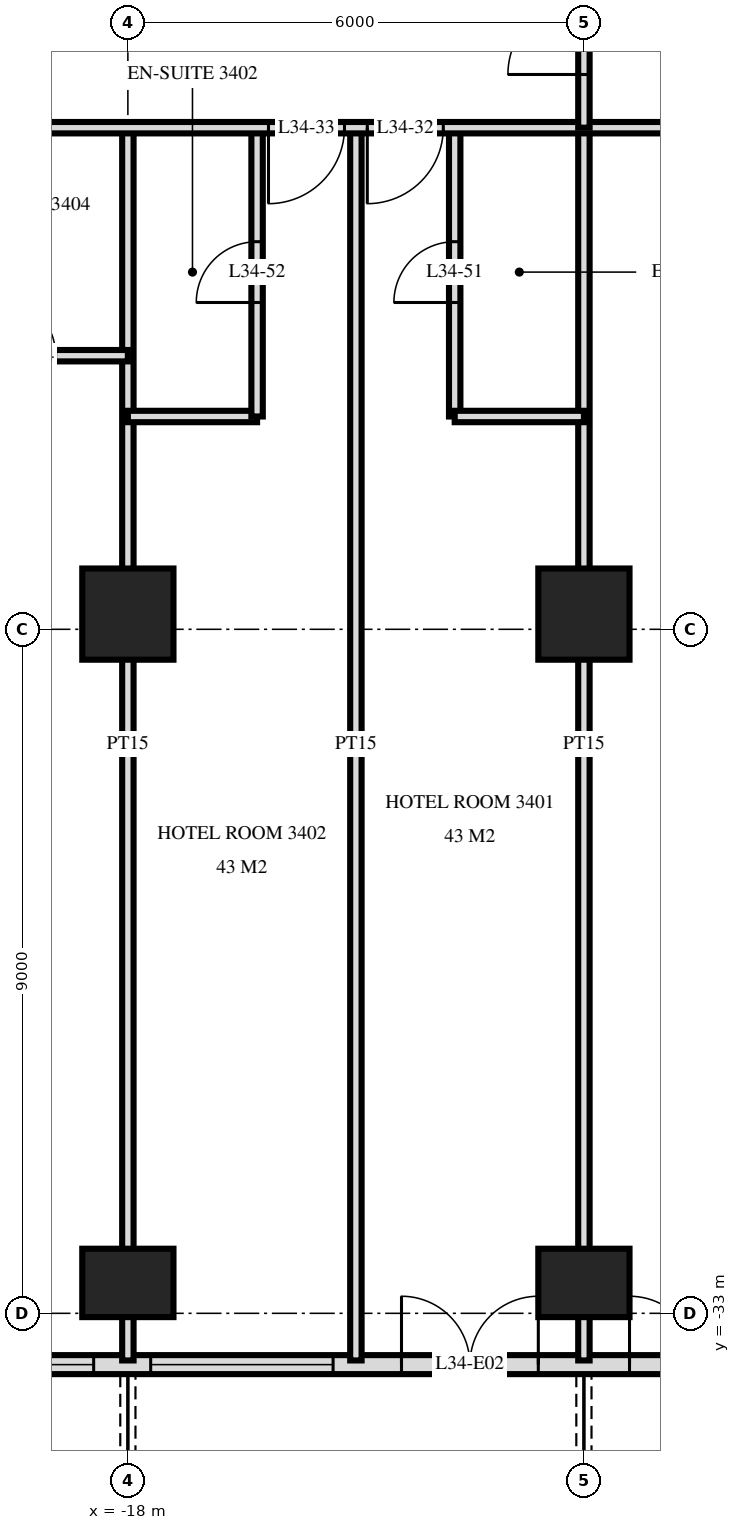
"""IFC4 building model, lengths in metres.
Left out: names, types, materials, properties, quantities, classifications, styles, units other than length and angle.
Written with IfcOpenShell. Run it as: python <this file> out.ifc"""

import sys

from ifc_helpers import new_model, si_unit, direction, frame, frame_2d, origin, origin_2d, place, context, subcontext, project, spatial, rectangle, extrude, element, fill, save


model = new_model("IFC4")
c1 = context("Model", 3, precision=1e-05, world=origin(), true_north=direction((0.0, 1.0)))
c2 = subcontext(c1, "Body", "Model", "MODEL_VIEW")
j1 = project(units=[si_unit("LENGTHUNIT", "METRE"), si_unit("PLANEANGLEUNIT", "RADIAN")], contexts=[c1])
p1 = place(None, origin())
s1 = spatial("IfcSite", under=j1, at=p1, CompositionType="ELEMENT")
p2 = place(p1, origin())
s2 = spatial("IfcBuilding", under=s1, at=p2, CompositionType="ELEMENT")
p3 = place(p2, frame((0.0, 0.0, 134.4)))
s3 = spatial("IfcBuildingStorey", under=s2, at=p3, CompositionType="ELEMENT", Elevation=134.4)
p4 = place(p3, frame((-18.0, -32.6, 0.0), z_axis=(0.0, 0.0, 1.0), x_axis=(1.0, 0.0, 0.0)))
e1 = element("IfcColumn", 1, at=p4, inside=s3, PredefinedType="COLUMN", context=c2, shape_type="SweptSolid", body=[
    extrude(rectangle(XDim=1.2, YDim=0.9, at=origin_2d()), origin(), (0.0, 0.0, 1.0), 3.6),
])
p5 = place(p3, frame((-18.0, -23.8, 0.0), z_axis=(0.0, 0.0, 1.0), x_axis=(1.0, 0.0, 0.0)))
e2 = element("IfcColumn", 2, at=p5, inside=s3, PredefinedType="COLUMN", context=c2, shape_type="SweptSolid", body=[
    extrude(rectangle(XDim=1.2, YDim=1.2, at=origin_2d()), origin(), (0.0, 0.0, 1.0), 3.6),
])
p6 = place(p3, frame((-12.0, -32.6, 0.0), z_axis=(0.0, 0.0, 1.0), x_axis=(1.0, 0.0, 0.0)))
e3 = element("IfcColumn", 3, at=p6, inside=s3, PredefinedType="COLUMN", context=c2, shape_type="SweptSolid", body=[
    extrude(rectangle(XDim=1.2, YDim=0.9, at=origin_2d()), origin(), (0.0, 0.0, 1.0), 3.6),
])
p7 = place(p3, frame((-12.0, -23.8, 0.0), z_axis=(0.0, 0.0, 1.0), x_axis=(1.0, 0.0, 0.0)))
e4 = element("IfcColumn", 4, at=p7, inside=s3, PredefinedType="COLUMN", context=c2, shape_type="SweptSolid", body=[
    extrude(rectangle(XDim=1.2, YDim=1.2, at=origin_2d()), origin(), (0.0, 0.0, 1.0), 3.6),
])
p8 = place(p3, frame((-23.675, -33.675, 0.0), z_axis=(0.0, 0.0, 1.0), x_axis=(1.0, 0.0, 0.0)))
e5 = element("IfcWall", 5, at=p8, inside=s3, PredefinedType="SOLIDWALL", context=c2, shape_type="SweptSolid", body=[
    extrude(rectangle(XDim=47.351, YDim=0.25, at=frame_2d((23.675, 0.0))), origin(), (0.0, 0.0, 1.0), 3.32),
])
p9 = place(p8, frame((0.575, 0.0, 0.0)))
e6 = element("IfcOpeningElement", 6, at=p9, cuts=e5, PredefinedType="OPENING", context=c2, shape_type="SweptSolid", body=[
    extrude(rectangle(XDim=1.8, YDim=2.4, at=frame_2d((0.9, 1.2))), frame((0.0, 0.135, 0.0), z_axis=(0.0, -1.0, 0.0), x_axis=(1.0, 0.0, 0.0)), (0.0, 0.0, 1.0), 0.27),
])
p10 = place(p8, frame((3.425, 0.0, 0.3)))
e7 = element("IfcOpeningElement", 7, at=p10, cuts=e5, PredefinedType="OPENING", context=c2, shape_type="SweptSolid", body=[
    extrude(rectangle(XDim=1.8, YDim=2.1, at=frame_2d((0.9, 1.05))), frame((0.0, 0.135, 0.0), z_axis=(0.0, -1.0, 0.0), x_axis=(1.0, 0.0, 0.0)), (0.0, 0.0, 1.0), 0.27),
])
p11 = place(p8, frame((5.975, 0.0, 0.3)))
e8 = element("IfcOpeningElement", 8, at=p11, cuts=e5, PredefinedType="OPENING", context=c2, shape_type="SweptSolid", body=[
    extrude(rectangle(XDim=2.4, YDim=2.1, at=frame_2d((1.2, 1.05))), frame((0.0, 0.135, 0.0), z_axis=(0.0, -1.0, 0.0), x_axis=(1.0, 0.0, 0.0)), (0.0, 0.0, 1.0), 0.27),
])
p12 = place(p8, frame((9.275, 0.0, 0.0)))
e9 = element("IfcOpeningElement", 9, at=p12, cuts=e5, PredefinedType="OPENING", context=c2, shape_type="SweptSolid", body=[
    extrude(rectangle(XDim=1.8, YDim=2.4, at=frame_2d((0.9, 1.2))), frame((0.0, 0.135, 0.0), z_axis=(0.0, -1.0, 0.0), x_axis=(1.0, 0.0, 0.0)), (0.0, 0.0, 1.0), 0.27),
])
p13 = place(p8, frame((12.275, 0.0, 0.0)))
e10 = element("IfcOpeningElement", 10, at=p13, cuts=e5, PredefinedType="OPENING", context=c2, shape_type="SweptSolid", body=[
    extrude(rectangle(XDim=1.8, YDim=2.4, at=frame_2d((0.9, 1.2))), frame((0.0, 0.135, 0.0), z_axis=(0.0, -1.0, 0.0), x_axis=(1.0, 0.0, 0.0)), (0.0, 0.0, 1.0), 0.27),
])
p14 = place(p8, frame((14.975, 0.0, 0.3)))
e11 = element("IfcOpeningElement", 11, at=p14, cuts=e5, PredefinedType="OPENING", context=c2, shape_type="SweptSolid", body=[
    extrude(rectangle(XDim=2.4, YDim=2.1, at=frame_2d((1.2, 1.05))), frame((0.0, 0.135, 0.0), z_axis=(0.0, -1.0, 0.0), x_axis=(1.0, 0.0, 0.0)), (0.0, 0.0, 1.0), 0.27),
])
p15 = place(p8, frame((17.975, 0.0, 0.3)))
e12 = element("IfcOpeningElement", 12, at=p15, cuts=e5, PredefinedType="OPENING", context=c2, shape_type="SweptSolid", body=[
    extrude(rectangle(XDim=2.4, YDim=2.1, at=frame_2d((1.2, 1.05))), frame((0.0, 0.135, 0.0), z_axis=(0.0, -1.0, 0.0), x_axis=(1.0, 0.0, 0.0)), (0.0, 0.0, 1.0), 0.27),
])
p16 = place(p8, frame((21.275, 0.0, 0.0)))
e13 = element("IfcOpeningElement", 13, at=p16, cuts=e5, PredefinedType="OPENING", context=c2, shape_type="SweptSolid", body=[
    extrude(rectangle(XDim=1.8, YDim=2.4, at=frame_2d((0.9, 1.2))), frame((0.0, 0.135, 0.0), z_axis=(0.0, -1.0, 0.0), x_axis=(1.0, 0.0, 0.0)), (0.0, 0.0, 1.0), 0.27),
])
p17 = place(p8, frame((24.275, 0.0, 0.0)))
e14 = element("IfcOpeningElement", 14, at=p17, cuts=e5, PredefinedType="OPENING", context=c2, shape_type="SweptSolid", body=[
    extrude(rectangle(XDim=1.8, YDim=2.4, at=frame_2d((0.9, 1.2))), frame((0.0, 0.135, 0.0), z_axis=(0.0, -1.0, 0.0), x_axis=(1.0, 0.0, 0.0)), (0.0, 0.0, 1.0), 0.27),
])
p18 = place(p8, frame((26.975, 0.0, 0.3)))
e15 = element("IfcOpeningElement", 15, at=p18, cuts=e5, PredefinedType="OPENING", context=c2, shape_type="SweptSolid", body=[
    extrude(rectangle(XDim=2.4, YDim=2.1, at=frame_2d((1.2, 1.05))), frame((0.0, 0.135, 0.0), z_axis=(0.0, -1.0, 0.0), x_axis=(1.0, 0.0, 0.0)), (0.0, 0.0, 1.0), 0.27),
])
p19 = place(p8, frame((30.275, 0.0, 0.0)))
e16 = element("IfcOpeningElement", 16, at=p19, cuts=e5, PredefinedType="OPENING", context=c2, shape_type="SweptSolid", body=[
    extrude(rectangle(XDim=1.8, YDim=2.4, at=frame_2d((0.9, 1.2))), frame((0.0, 0.135, 0.0), z_axis=(0.0, -1.0, 0.0), x_axis=(1.0, 0.0, 0.0)), (0.0, 0.0, 1.0), 0.27),
])
p20 = place(p8, frame((32.975, 0.0, 0.3)))
e17 = element("IfcOpeningElement", 17, at=p20, cuts=e5, PredefinedType="OPENING", context=c2, shape_type="SweptSolid", body=[
    extrude(rectangle(XDim=2.4, YDim=2.1, at=frame_2d((1.2, 1.05))), frame((0.0, 0.135, 0.0), z_axis=(0.0, -1.0, 0.0), x_axis=(1.0, 0.0, 0.0)), (0.0, 0.0, 1.0), 0.27),
])
p21 = place(p8, frame((36.275, 0.0, 0.0)))
e18 = element("IfcOpeningElement", 18, at=p21, cuts=e5, PredefinedType="OPENING", context=c2, shape_type="SweptSolid", body=[
    extrude(rectangle(XDim=1.8, YDim=2.4, at=frame_2d((0.9, 1.2))), frame((0.0, 0.135, 0.0), z_axis=(0.0, -1.0, 0.0), x_axis=(1.0, 0.0, 0.0)), (0.0, 0.0, 1.0), 0.27),
])
p22 = place(p8, frame((38.975, 0.0, 0.3)))
e19 = element("IfcOpeningElement", 19, at=p22, cuts=e5, PredefinedType="OPENING", context=c2, shape_type="SweptSolid", body=[
    extrude(rectangle(XDim=2.4, YDim=2.1, at=frame_2d((1.2, 1.05))), frame((0.0, 0.135, 0.0), z_axis=(0.0, -1.0, 0.0), x_axis=(1.0, 0.0, 0.0)), (0.0, 0.0, 1.0), 0.27),
])
p23 = place(p8, frame((42.275, 0.0, 0.0)))
e20 = element("IfcOpeningElement", 20, at=p23, cuts=e5, PredefinedType="OPENING", context=c2, shape_type="SweptSolid", body=[
    extrude(rectangle(XDim=1.8, YDim=2.4, at=frame_2d((0.9, 1.2))), frame((0.0, 0.135, 0.0), z_axis=(0.0, -1.0, 0.0), x_axis=(1.0, 0.0, 0.0)), (0.0, 0.0, 1.0), 0.27),
])
p24 = place(p8, frame((45.125, 0.0, 0.3)))
e21 = element("IfcOpeningElement", 21, at=p24, cuts=e5, PredefinedType="OPENING", context=c2, shape_type="SweptSolid", body=[
    extrude(rectangle(XDim=1.8, YDim=2.1, at=frame_2d((0.9, 1.05))), frame((0.0, 0.135, 0.0), z_axis=(0.0, -1.0, 0.0), x_axis=(1.0, 0.0, 0.0)), (0.0, 0.0, 1.0), 0.27),
])
p25 = place(p3, frame((-12.0, -17.4, 0.0), z_axis=(0.0, 0.0, 1.0), x_axis=(0.0, 1.0, 0.0)))
e22 = element("IfcWall", 22, at=p25, inside=s3, PredefinedType="PARTITIONING", context=c2, shape_type="SweptSolid", body=[
    extrude(rectangle(XDim=2.35, YDim=0.15, at=frame_2d((1.175, 0.0))), origin(), (0.0, 0.0, 1.0), 3.32),
])
p26 = place(p25, frame((0.7, 0.0, 0.0)))
e23 = element("IfcOpeningElement", 23, at=p26, cuts=e22, PredefinedType="OPENING", context=c2, shape_type="SweptSolid", body=[
    extrude(rectangle(XDim=1.0, YDim=2.1, at=frame_2d((0.5, 1.05))), frame((0.0, 0.085, 0.0), z_axis=(0.0, -1.0, 0.0), x_axis=(1.0, 0.0, 0.0)), (0.0, 0.0, 1.0), 0.17),
])
p27 = place(p3, frame((-12.0, -33.62, 0.0), z_axis=(0.0, 0.0, 1.0), x_axis=(0.0, 1.0, 0.0)))
e24 = element("IfcWall", 24, at=p27, inside=s3, PredefinedType="PARTITIONING", context=c2, shape_type="SweptSolid", body=[
    extrude(rectangle(XDim=16.22, YDim=0.15, at=frame_2d((8.11, 0.0))), origin(), (0.0, 0.0, 1.0), 3.32),
])
p28 = place(p3, frame((-13.7, -21.2, 0.0), z_axis=(0.0, 0.0, 1.0), x_axis=(0.0, 1.0, 0.0)))
e25 = element("IfcWall", 25, at=p28, inside=s3, PredefinedType="PARTITIONING", context=c2, shape_type="SweptSolid", body=[
    extrude(rectangle(XDim=3.8, YDim=0.15, at=frame_2d((1.9, 0.0))), origin(), (0.0, 0.0, 1.0), 3.32),
])
p29 = place(p28, frame((1.5, 0.0, 0.0)))
e26 = element("IfcOpeningElement", 26, at=p29, cuts=e25, PredefinedType="OPENING", context=c2, shape_type="SweptSolid", body=[
    extrude(rectangle(XDim=0.8, YDim=2.1, at=frame_2d((0.4, 1.05))), frame((0.0, 0.085, 0.0), z_axis=(0.0, -1.0, 0.0), x_axis=(1.0, 0.0, 0.0)), (0.0, 0.0, 1.0), 0.17),
])
p30 = place(p3, frame((-15.0, -33.62, 0.0), z_axis=(0.0, 0.0, 1.0), x_axis=(0.0, 1.0, 0.0)))
e27 = element("IfcWall", 27, at=p30, inside=s3, PredefinedType="PARTITIONING", context=c2, shape_type="SweptSolid", body=[
    extrude(rectangle(XDim=16.22, YDim=0.15, at=frame_2d((8.11, 0.0))), origin(), (0.0, 0.0, 1.0), 3.32),
])
p31 = place(p3, frame((-16.3, -21.2, 0.0), z_axis=(0.0, 0.0, 1.0), x_axis=(0.0, 1.0, 0.0)))
e28 = element("IfcWall", 28, at=p31, inside=s3, PredefinedType="PARTITIONING", context=c2, shape_type="SweptSolid", body=[
    extrude(rectangle(XDim=3.8, YDim=0.15, at=frame_2d((1.9, 0.0))), origin(), (0.0, 0.0, 1.0), 3.32),
])
p32 = place(p31, frame((1.5, 0.0, 0.0)))
e29 = element("IfcOpeningElement", 29, at=p32, cuts=e28, PredefinedType="OPENING", context=c2, shape_type="SweptSolid", body=[
    extrude(rectangle(XDim=0.8, YDim=2.1, at=frame_2d((0.4, 1.05))), frame((0.0, 0.085, 0.0), z_axis=(0.0, -1.0, 0.0), x_axis=(1.0, 0.0, 0.0)), (0.0, 0.0, 1.0), 0.17),
])
p33 = place(p3, frame((-18.0, -33.62, 0.0), z_axis=(0.0, 0.0, 1.0), x_axis=(0.0, 1.0, 0.0)))
e30 = element("IfcWall", 30, at=p33, inside=s3, PredefinedType="PARTITIONING", context=c2, shape_type="SweptSolid", body=[
    extrude(rectangle(XDim=16.22, YDim=0.15, at=frame_2d((8.11, 0.0))), origin(), (0.0, 0.0, 1.0), 3.32),
])
for number, where, z_axis, x_axis in (
    (31, (-18.0, -21.2, 0.0), (0.0, 0.0, 1.0), (1.0, 0.0, 0.0)),
    (32, (-13.7, -21.2, 0.0), (0.0, 0.0, 1.0), (1.0, 0.0, 0.0)),
):
    element("IfcWall", number, at=place(p3, frame(where, z_axis=z_axis, x_axis=x_axis)), inside=s3, PredefinedType="PARTITIONING", context=c2, shape_type="SweptSolid", body=[
        extrude(rectangle(XDim=1.7, YDim=0.15, at=frame_2d((0.85, 0.0))), origin(), (0.0, 0.0, 1.0), 3.32),
    ])
p34 = place(p3, frame((-22.2, -20.4, 0.0), z_axis=(0.0, 0.0, 1.0), x_axis=(1.0, 0.0, 0.0)))
e33 = element("IfcWall", 33, at=p34, inside=s3, PredefinedType="PARTITIONING", context=c2, shape_type="SweptSolid", body=[
    extrude(rectangle(XDim=4.2, YDim=0.15, at=frame_2d((2.1, 0.0))), origin(), (0.0, 0.0, 1.0), 3.32),
])
p35 = place(p34, frame((2.45, 0.0, 0.0)))
e34 = element("IfcOpeningElement", 34, at=p35, cuts=e33, PredefinedType="OPENING", context=c2, shape_type="SweptSolid", body=[
    extrude(rectangle(XDim=0.8, YDim=2.1, at=frame_2d((0.4, 1.05))), frame((0.0, 0.085, 0.0), z_axis=(0.0, -1.0, 0.0), x_axis=(1.0, 0.0, 0.0)), (0.0, 0.0, 1.0), 0.17),
])
p36 = place(p3, frame((-28.02, -17.4, 0.0), z_axis=(0.0, 0.0, 1.0), x_axis=(1.0, 0.0, 0.0)))
e35 = element("IfcWall", 35, at=p36, inside=s3, PredefinedType="PARTITIONING", context=c2, shape_type="SweptSolid", body=[
    extrude(rectangle(XDim=56.04, YDim=0.15, at=frame_2d((28.02, 0.0))), origin(), (0.0, 0.0, 1.0), 3.32),
])
p37 = place(p36, frame((13.17, 0.0, 0.0)))
e36 = element("IfcOpeningElement", 36, at=p37, cuts=e35, PredefinedType="OPENING", context=c2, shape_type="SweptSolid", body=[
    extrude(rectangle(XDim=1.0, YDim=2.1, at=frame_2d((0.5, 1.05))), frame((0.0, 0.085, 0.0), z_axis=(0.0, -1.0, 0.0), x_axis=(1.0, 0.0, 0.0)), (0.0, 0.0, 1.0), 0.17),
])
p38 = place(p36, frame((11.87, 0.0, 0.0)))
e37 = element("IfcOpeningElement", 37, at=p38, cuts=e35, PredefinedType="OPENING", context=c2, shape_type="SweptSolid", body=[
    extrude(rectangle(XDim=1.0, YDim=2.1, at=frame_2d((0.5, 1.05))), frame((0.0, 0.085, 0.0), z_axis=(0.0, -1.0, 0.0), x_axis=(1.0, 0.0, 0.0)), (0.0, 0.0, 1.0), 0.17),
])
p39 = place(p36, frame((2.32, 0.0, 0.0)))
e38 = element("IfcOpeningElement", 38, at=p39, cuts=e35, PredefinedType="OPENING", context=c2, shape_type="SweptSolid", body=[
    extrude(rectangle(XDim=1.0, YDim=2.1, at=frame_2d((0.5, 1.05))), frame((0.0, 0.085, 0.0), z_axis=(0.0, -1.0, 0.0), x_axis=(1.0, 0.0, 0.0)), (0.0, 0.0, 1.0), 0.17),
])
p40 = place(p36, frame((40.17, 0.0, 0.0)))
e39 = element("IfcOpeningElement", 39, at=p40, cuts=e35, PredefinedType="OPENING", context=c2, shape_type="SweptSolid", body=[
    extrude(rectangle(XDim=1.0, YDim=2.1, at=frame_2d((0.5, 1.05))), frame((0.0, 0.085, 0.0), z_axis=(0.0, -1.0, 0.0), x_axis=(1.0, 0.0, 0.0)), (0.0, 0.0, 1.0), 0.17),
])
p41 = place(p36, frame((51.22, 0.0, 0.0)))
e40 = element("IfcOpeningElement", 40, at=p41, cuts=e35, PredefinedType="OPENING", context=c2, shape_type="SweptSolid", body=[
    extrude(rectangle(XDim=1.0, YDim=2.1, at=frame_2d((0.5, 1.05))), frame((0.0, 0.085, 0.0), z_axis=(0.0, -1.0, 0.0), x_axis=(1.0, 0.0, 0.0)), (0.0, 0.0, 1.0), 0.17),
])
p42 = place(p36, frame((18.52, 0.0, 0.0)))
e41 = element("IfcOpeningElement", 41, at=p42, cuts=e35, PredefinedType="OPENING", context=c2, shape_type="SweptSolid", body=[
    extrude(rectangle(XDim=1.0, YDim=2.1, at=frame_2d((0.5, 1.05))), frame((0.0, 0.085, 0.0), z_axis=(0.0, -1.0, 0.0), x_axis=(1.0, 0.0, 0.0)), (0.0, 0.0, 1.0), 0.17),
])
p43 = place(p36, frame((26.02, 0.0, 0.0)))
e42 = element("IfcOpeningElement", 42, at=p43, cuts=e35, PredefinedType="OPENING", context=c2, shape_type="SweptSolid", body=[
    extrude(rectangle(XDim=1.0, YDim=2.1, at=frame_2d((0.5, 1.05))), frame((0.0, 0.085, 0.0), z_axis=(0.0, -1.0, 0.0), x_axis=(1.0, 0.0, 0.0)), (0.0, 0.0, 1.0), 0.17),
])
p44 = place(p36, frame((35.02, 0.0, 0.0)))
e43 = element("IfcOpeningElement", 43, at=p44, cuts=e35, PredefinedType="OPENING", context=c2, shape_type="SweptSolid", body=[
    extrude(rectangle(XDim=1.0, YDim=2.1, at=frame_2d((0.5, 1.05))), frame((0.0, 0.085, 0.0), z_axis=(0.0, -1.0, 0.0), x_axis=(1.0, 0.0, 0.0)), (0.0, 0.0, 1.0), 0.17),
])
p45 = place(p10, origin())
e44 = element("IfcWindow", 44, at=p45, inside=s3, PartitioningType="SINGLE_PANEL", PredefinedType="WINDOW", context=c2, shape_type="SweptSolid", body=[
    extrude(rectangle(XDim=1.8, YDim=2.1, at=frame_2d((0.9, 1.05))), frame((0.0, 0.03, 0.0), z_axis=(0.0, -1.0, 0.0), x_axis=(1.0, 0.0, 0.0)), (0.0, 0.0, 1.0), 0.06),
])
fill(e7, e44)
p46 = place(p11, origin())
e45 = element("IfcWindow", 45, at=p46, inside=s3, PartitioningType="SINGLE_PANEL", PredefinedType="WINDOW", context=c2, shape_type="SweptSolid", body=[
    extrude(rectangle(XDim=2.4, YDim=2.1, at=frame_2d((1.2, 1.05))), frame((0.0, 0.03, 0.0), z_axis=(0.0, -1.0, 0.0), x_axis=(1.0, 0.0, 0.0)), (0.0, 0.0, 1.0), 0.06),
])
fill(e8, e45)
p47 = place(p12, origin())
e46 = element("IfcDoor", 46, at=p47, inside=s3, OperationType="DOUBLE_DOOR_SINGLE_SWING", PredefinedType="DOOR", context=c2, shape_type="SweptSolid", body=[
    extrude(rectangle(XDim=1.8, YDim=2.4, at=frame_2d((0.9, 1.2))), frame((0.0, 0.025, 0.0), z_axis=(0.0, -1.0, 0.0), x_axis=(1.0, 0.0, 0.0)), (0.0, 0.0, 1.0), 0.05),
])
fill(e9, e46)
p48 = place(p13, origin())
e47 = element("IfcDoor", 47, at=p48, inside=s3, OperationType="DOUBLE_DOOR_SINGLE_SWING", PredefinedType="DOOR", context=c2, shape_type="SweptSolid", body=[
    extrude(rectangle(XDim=1.8, YDim=2.4, at=frame_2d((0.9, 1.2))), frame((0.0, 0.025, 0.0), z_axis=(0.0, -1.0, 0.0), x_axis=(1.0, 0.0, 0.0)), (0.0, 0.0, 1.0), 0.05),
])
fill(e10, e47)
p49 = place(p26, origin())
e48 = element("IfcDoor", 48, at=p49, inside=s3, OperationType="SINGLE_SWING_RIGHT", PredefinedType="DOOR", context=c2, shape_type="SweptSolid", body=[
    extrude(rectangle(XDim=1.0, YDim=2.1, at=frame_2d((0.5, 1.05))), frame((0.0, 0.025, 0.0), z_axis=(0.0, -1.0, 0.0), x_axis=(1.0, 0.0, 0.0)), (0.0, 0.0, 1.0), 0.05),
])
fill(e23, e48)
p50 = place(p37, frame((0.5, 0.0, 0.0), z_axis=(0.0, 0.0, 1.0), x_axis=(-1.0, 0.0, 0.0)))
e49 = element("IfcDoor", 49, at=p50, inside=s3, OperationType="SINGLE_SWING_LEFT", PredefinedType="DOOR", context=c2, shape_type="SweptSolid", body=[
    extrude(rectangle(XDim=1.0, YDim=2.1, at=frame_2d((0.0, 1.05))), frame((0.0, -0.025, 0.0), z_axis=(0.0, 1.0, 0.0), x_axis=(-1.0, 0.0, 0.0)), (0.0, 0.0, 1.0), 0.05),
])
fill(e36, e49)
p51 = place(p38, frame((0.5, 0.0, 0.0), z_axis=(0.0, 0.0, 1.0), x_axis=(-1.0, 0.0, 0.0)))
e50 = element("IfcDoor", 50, at=p51, inside=s3, OperationType="SINGLE_SWING_LEFT", PredefinedType="DOOR", context=c2, shape_type="SweptSolid", body=[
    extrude(rectangle(XDim=1.0, YDim=2.1, at=frame_2d((0.0, 1.05))), frame((0.0, -0.025, 0.0), z_axis=(0.0, 1.0, 0.0), x_axis=(-1.0, 0.0, 0.0)), (0.0, 0.0, 1.0), 0.05),
])
fill(e37, e50)
p52 = place(p29, origin())
e51 = element("IfcDoor", 51, at=p52, inside=s3, OperationType="SINGLE_SWING_RIGHT", PredefinedType="DOOR", context=c2, shape_type="SweptSolid", body=[
    extrude(rectangle(XDim=0.8, YDim=2.1, at=frame_2d((0.4, 1.05))), frame((0.0, 0.025, 0.0), z_axis=(0.0, -1.0, 0.0), x_axis=(1.0, 0.0, 0.0)), (0.0, 0.0, 1.0), 0.05),
])
fill(e26, e51)
p53 = place(p32, origin())
e52 = element("IfcDoor", 52, at=p53, inside=s3, OperationType="SINGLE_SWING_RIGHT", PredefinedType="DOOR", context=c2, shape_type="SweptSolid", body=[
    extrude(rectangle(XDim=0.8, YDim=2.1, at=frame_2d((0.4, 1.05))), frame((0.0, 0.025, 0.0), z_axis=(0.0, -1.0, 0.0), x_axis=(1.0, 0.0, 0.0)), (0.0, 0.0, 1.0), 0.05),
])
fill(e29, e52)
p54 = place(p35, origin())
e53 = element("IfcDoor", 53, at=p54, inside=s3, OperationType="SINGLE_SWING_RIGHT", PredefinedType="DOOR", context=c2, shape_type="SweptSolid", body=[
    extrude(rectangle(XDim=0.8, YDim=2.1, at=frame_2d((0.4, 1.05))), frame((0.0, 0.025, 0.0), z_axis=(0.0, -1.0, 0.0), x_axis=(1.0, 0.0, 0.0)), (0.0, 0.0, 1.0), 0.05),
])
fill(e34, e53)
save(model, sys.argv[1])
